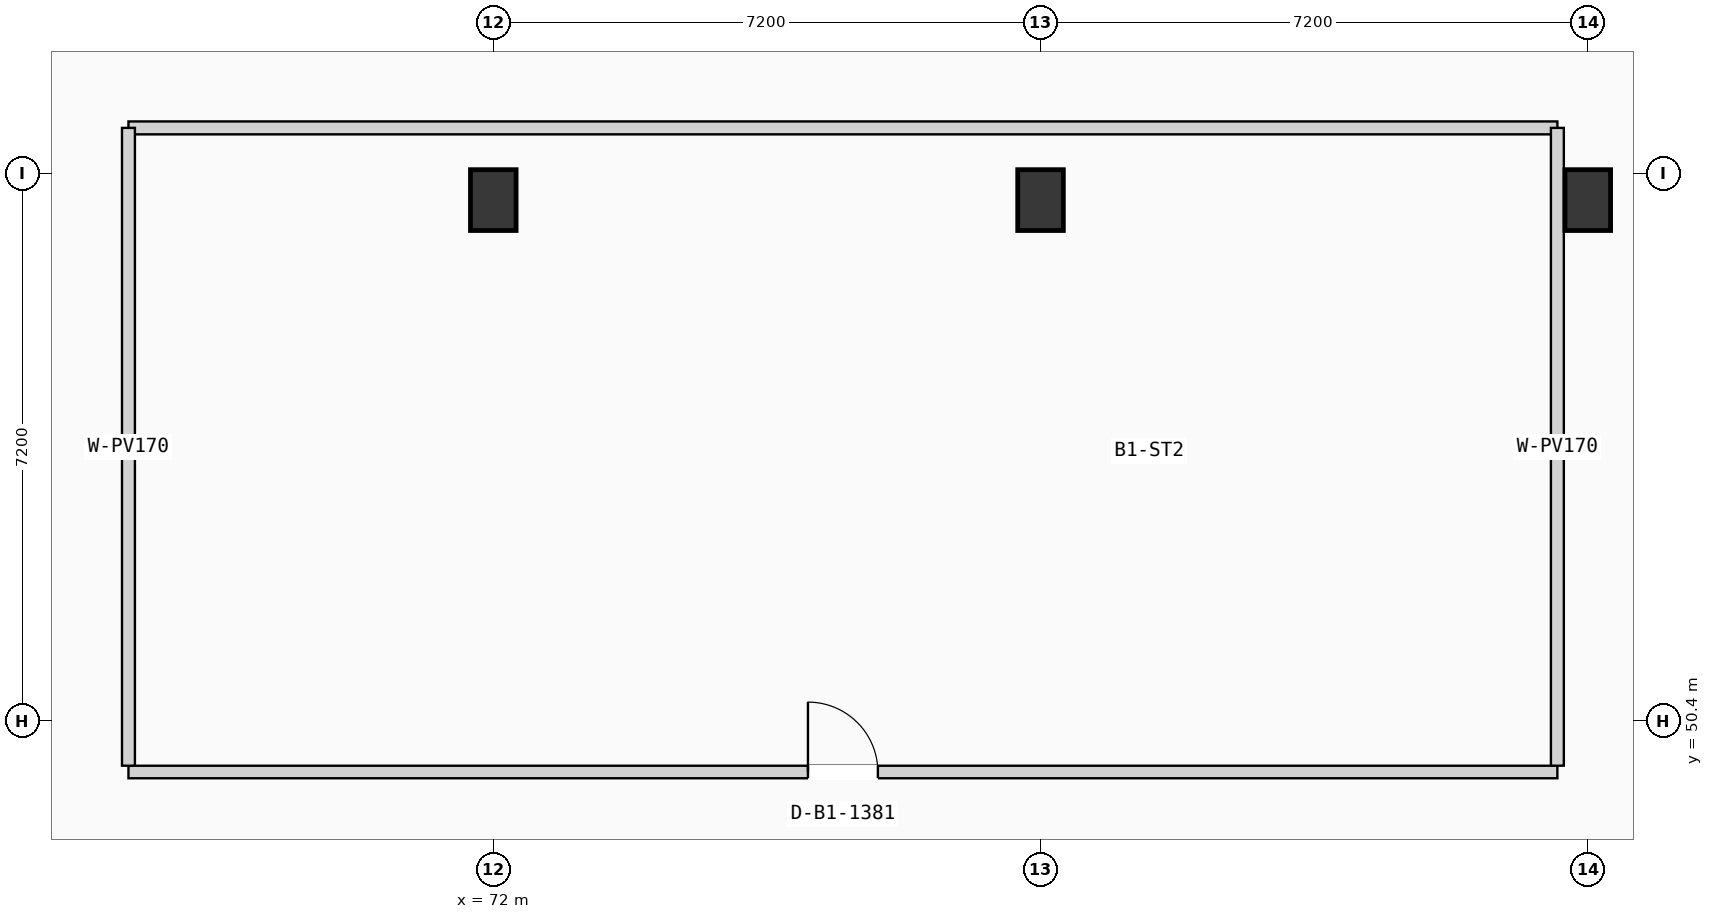
"""IFC4 building model, lengths in metres.
Left out: names, types, materials, properties, quantities, classifications, styles, units other than length and angle.
Written with IfcOpenShell. Run it as: python <this file> out.ifc"""

import sys

from ifc_helpers import new_model, si_unit, direction, frame, frame_2d, origin, origin_2d, place, context, subcontext, project, spatial, rectangle, extrude, element, fill, save


model = new_model("IFC4")
c1 = context("Model", 3, precision=1e-05, world=origin(), true_north=direction((0.0, 1.0)))
c2 = subcontext(c1, "Body", "Model", "MODEL_VIEW")
j1 = project(units=[si_unit("LENGTHUNIT", "METRE"), si_unit("PLANEANGLEUNIT", "RADIAN")], contexts=[c1])
p1 = place(None, origin())
s1 = spatial("IfcSite", under=j1, at=p1, CompositionType="ELEMENT")
p2 = place(p1, origin())
s2 = spatial("IfcBuilding", under=s1, at=p2, CompositionType="ELEMENT")
p3 = place(p2, frame((0.0, 0.0, -4.2)))
s3 = spatial("IfcBuildingStorey", under=s2, at=p3, CompositionType="ELEMENT", Elevation=-4.2)
for number, where, z_axis, x_axis in (
    (1, (72.0, 57.25, 0.0), (0.0, 0.0, 1.0), (1.0, 0.0, 0.0)),
    (2, (79.2, 57.25, 0.0), (0.0, 0.0, 1.0), (1.0, 0.0, 0.0)),
    (3, (86.4, 57.25, 0.0), (0.0, 0.0, 1.0), (1.0, 0.0, 0.0)),
):
    element("IfcColumn", number, at=place(p3, frame(where, z_axis=z_axis, x_axis=x_axis)), inside=s3, PredefinedType="COLUMN", context=c2, shape_type="SweptSolid", body=[
        extrude(rectangle(XDim=0.6, YDim=0.8, at=origin_2d()), origin(), (0.0, 0.0, 1.0), 4.2),
    ])
p4 = place(p3, frame((67.2, 49.725, 0.0), z_axis=(0.0, 0.0, 1.0), x_axis=(1.0, 0.0, 0.0)))
e4 = element("IfcWall", 4, at=p4, inside=s3, PredefinedType="PARTITIONING", context=c2, shape_type="SweptSolid", body=[
    extrude(rectangle(XDim=18.8, YDim=0.165, at=frame_2d((9.4, 0.0))), origin(), (0.0, 0.0, 1.0), 3.84),
])
p5 = place(p4, frame((8.94, 0.0, 0.0)))
e5 = element("IfcOpeningElement", 5, at=p5, cuts=e4, PredefinedType="OPENING", context=c2, shape_type="SweptSolid", body=[
    extrude(rectangle(XDim=0.92, YDim=2.04, at=frame_2d((0.46, 1.02))), frame((0.0, 0.093, 0.0), z_axis=(0.0, -1.0, 0.0), x_axis=(1.0, 0.0, 0.0)), (0.0, 0.0, 1.0), 0.185),
])
p6 = place(p3, frame((67.2, 58.2, 0.0), z_axis=(0.0, 0.0, 1.0), x_axis=(1.0, 0.0, 0.0)))
e6 = element("IfcWall", 6, at=p6, inside=s3, PredefinedType="PARTITIONING", context=c2, shape_type="SweptSolid", body=[
    extrude(rectangle(XDim=18.8, YDim=0.17, at=frame_2d((9.4, 0.0))), origin(), (0.0, 0.0, 1.0), 3.84),
])
p7 = place(p3, frame((67.2, 49.808, 0.0), z_axis=(0.0, 0.0, 1.0), x_axis=(0.0, 1.0, 0.0)))
e7 = element("IfcWall", 7, at=p7, inside=s3, PredefinedType="PARTITIONING", context=c2, shape_type="SweptSolid", body=[
    extrude(rectangle(XDim=8.392, YDim=0.17, at=frame_2d((4.196, 0.0))), origin(), (0.0, 0.0, 1.0), 3.84),
])
p8 = place(p3, frame((86.0, 49.808, 0.0), z_axis=(0.0, 0.0, 1.0), x_axis=(0.0, 1.0, 0.0)))
e8 = element("IfcWall", 8, at=p8, inside=s3, PredefinedType="PARTITIONING", context=c2, shape_type="SweptSolid", body=[
    extrude(rectangle(XDim=8.392, YDim=0.17, at=frame_2d((4.196, 0.0))), origin(), (0.0, 0.0, 1.0), 2.85),
])
p9 = place(p5, origin())
e9 = element("IfcDoor", 9, at=p9, inside=s3, OperationType="SINGLE_SWING_LEFT", PredefinedType="DOOR", context=c2, shape_type="SweptSolid", body=[
    extrude(rectangle(XDim=0.92, YDim=2.04, at=frame_2d((0.46, 1.02))), frame((0.0, 0.025, 0.0), z_axis=(0.0, -1.0, 0.0), x_axis=(1.0, 0.0, 0.0)), (0.0, 0.0, 1.0), 0.05),
])
fill(e5, e9)
save(model, sys.argv[1])
